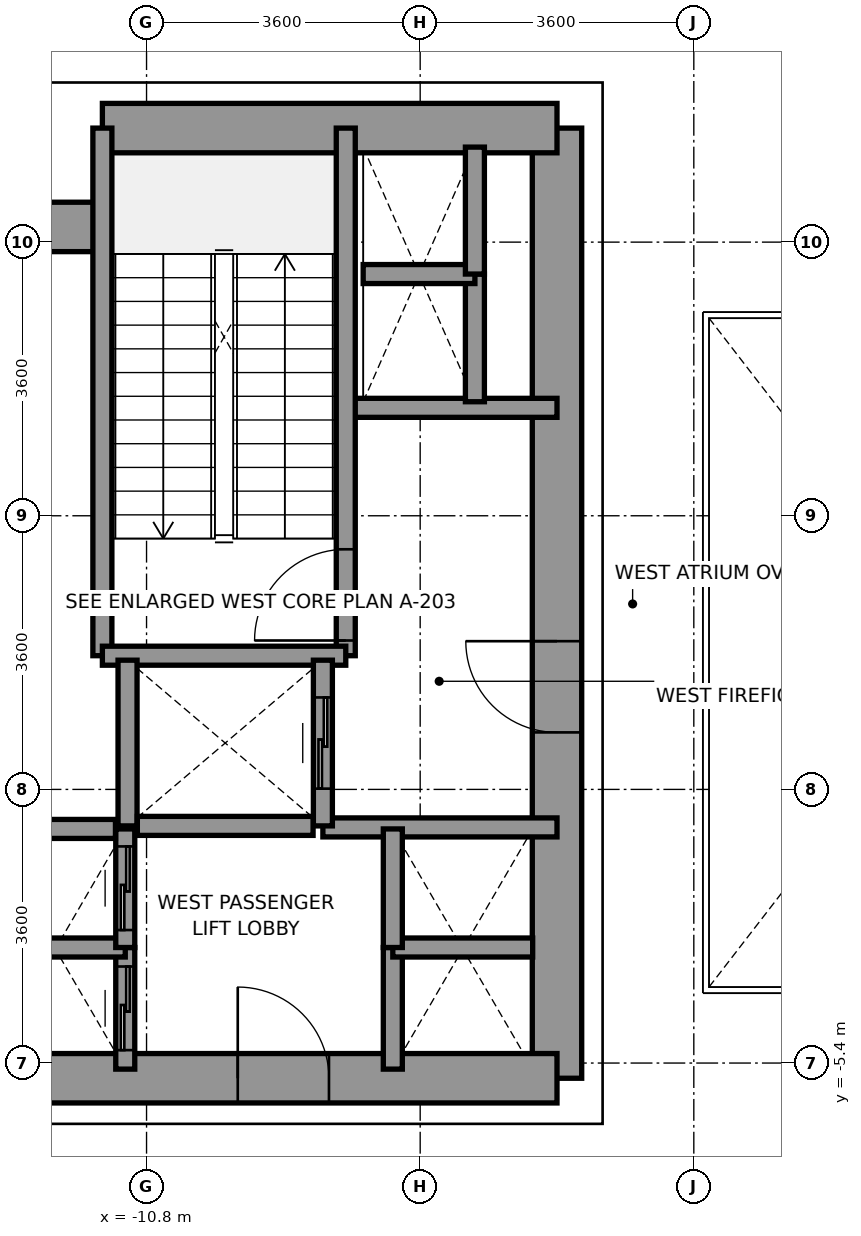
"""IFC4 building model, lengths in metres.
Left out: names, types, materials, properties, quantities, classifications, styles, units other than length and angle.
Written with IfcOpenShell. Run it as: python <this file> out.ifc"""

import sys

from ifc_helpers import new_model, si_unit, direction, frame, frame_2d, origin, place, context, subcontext, project, spatial, rectangle, extrude, source, transform, mapped, element, fill, save


model = new_model("IFC4")
c1 = context("Model", 3, precision=1e-05, world=origin(), true_north=direction((0.0, 1.0)))
c2 = subcontext(c1, "Body", "Model", "MODEL_VIEW")
j1 = project(units=[si_unit("LENGTHUNIT", "METRE"), si_unit("PLANEANGLEUNIT", "RADIAN")], contexts=[c1])
p1 = place(None, origin())
s1 = spatial("IfcSite", under=j1, at=p1, CompositionType="ELEMENT")
p2 = place(p1, origin())
s2 = spatial("IfcBuilding", under=s1, at=p2, CompositionType="ELEMENT")
p3 = place(p2, frame((0.0, 0.0, 5.4)))
s3 = spatial("IfcBuildingStorey", under=s2, at=p3, CompositionType="ELEMENT", Elevation=5.4)
p4 = place(p3, frame((-5.4, -5.6, 0.0), z_axis=(0.0, 0.0, 1.0), x_axis=(0.0, 1.0, 0.0)))
e1 = element("IfcWall", 1, at=p4, inside=s3, PredefinedType="SHEAR", context=c2, shape_type="SweptSolid", body=[
    extrude(rectangle(XDim=12.5, YDim=0.65, at=frame_2d((6.25, 0.0))), origin(), (0.0, 0.0, 1.0), 4.52),
])
p5 = place(p4, frame((4.55, 0.0, 0.0)))
e2 = element("IfcOpeningElement", 2, at=p5, cuts=e1, PredefinedType="OPENING", context=c2, shape_type="SweptSolid", body=[
    extrude(rectangle(XDim=1.2, YDim=2.2, at=frame_2d((0.6, 1.1))), frame((0.0, 0.335, 0.0), z_axis=(0.0, -1.0, 0.0), x_axis=(1.0, 0.0, 0.0)), (0.0, 0.0, 1.0), 0.67),
])
p6 = place(p3, frame((-11.381, 6.9, 0.0), z_axis=(0.0, 0.0, 1.0), x_axis=(1.0, 0.0, 0.0)))
e3 = element("IfcWall", 3, at=p6, inside=s3, PredefinedType="SHEAR", context=c2, shape_type="SweptSolid", body=[
    extrude(rectangle(XDim=5.981, YDim=0.65, at=frame_2d((2.991, 0.0))), origin(), (0.0, 0.0, 1.0), 4.52),
])
p7 = place(p3, frame((-13.2, 5.6, 0.0), z_axis=(0.0, 0.0, 1.0), x_axis=(1.0, 0.0, 0.0)))
e4 = element("IfcWall", 4, at=p7, inside=s3, PredefinedType="SHEAR", context=c2, shape_type="SweptSolid", body=[
    extrude(rectangle(XDim=1.819, YDim=0.65, at=frame_2d((0.909, 0.0))), origin(), (0.0, 0.0, 1.0), 4.52),
])
p8 = place(p3, frame((-13.2, -5.6, 0.0), z_axis=(0.0, 0.0, 1.0), x_axis=(1.0, 0.0, 0.0)))
e5 = element("IfcWall", 5, at=p8, inside=s3, PredefinedType="SHEAR", context=c2, shape_type="SweptSolid", body=[
    extrude(rectangle(XDim=7.8, YDim=0.65, at=frame_2d((3.9, 0.0))), origin(), (0.0, 0.0, 1.0), 4.52),
])
p9 = place(p8, frame((3.6, 0.0, 0.0)))
e6 = element("IfcOpeningElement", 6, at=p9, cuts=e5, PredefinedType="OPENING", context=c2, shape_type="SweptSolid", body=[
    extrude(rectangle(XDim=1.2, YDim=2.2, at=frame_2d((0.6, 1.1))), frame((0.0, 0.335, 0.0), z_axis=(0.0, -1.0, 0.0), x_axis=(1.0, 0.0, 0.0)), (0.0, 0.0, 1.0), 0.67),
])
p10 = place(p3, frame((-8.18, 3.22, 0.0), z_axis=(0.0, 0.0, 1.0), x_axis=(1.0, 0.0, 0.0)))
e7 = element("IfcWall", 7, at=p10, inside=s3, PredefinedType="SOLIDWALL", context=c2, shape_type="SweptSolid", body=[
    extrude(rectangle(XDim=2.78, YDim=0.25, at=frame_2d((1.39, 0.0))), origin(), (0.0, 0.0, 1.0), 4.52),
])
p11 = place(p3, frame((-8.48, -2.3, 0.0), z_axis=(0.0, 0.0, 1.0), x_axis=(1.0, 0.0, 0.0)))
e8 = element("IfcWall", 8, at=p11, inside=s3, PredefinedType="SOLIDWALL", context=c2, shape_type="SweptSolid", body=[
    extrude(rectangle(XDim=3.08, YDim=0.25, at=frame_2d((1.54, 0.0))), origin(), (0.0, 0.0, 1.0), 4.52),
])
p12 = place(p3, frame((-8.179, -0.041, 0.0), z_axis=(0.0, 0.0, 1.0), x_axis=(0.0, 1.0, 0.0)))
e9 = element("IfcWall", 9, at=p12, inside=s3, PredefinedType="SOLIDWALL", context=c2, shape_type="SweptSolid", body=[
    extrude(rectangle(XDim=6.941, YDim=0.25, at=frame_2d((3.47, 0.0))), origin(), (0.0, 0.0, 1.0), 4.52),
])
p13 = place(p12, frame((0.2, 0.0, 0.0)))
e10 = element("IfcOpeningElement", 10, at=p13, cuts=e9, PredefinedType="OPENING", context=c2, shape_type="SweptSolid", body=[
    extrude(rectangle(XDim=1.2, YDim=2.2, at=frame_2d((0.6, 1.1))), frame((0.0, 0.135, 0.0), z_axis=(0.0, -1.0, 0.0), x_axis=(1.0, 0.0, 0.0)), (0.0, 0.0, 1.0), 0.27),
])
p14 = place(p3, frame((-11.381, -0.041, 0.0), z_axis=(0.0, 0.0, 1.0), x_axis=(0.0, 1.0, 0.0)))
e11 = element("IfcWall", 11, at=p14, inside=s3, PredefinedType="SOLIDWALL", context=c2, shape_type="SweptSolid", body=[
    extrude(rectangle(XDim=6.941, YDim=0.25, at=frame_2d((3.47, 0.0))), origin(), (0.0, 0.0, 1.0), 4.52),
])
p15 = place(p3, frame((-11.381, -0.041, 0.0), z_axis=(0.0, 0.0, 1.0), x_axis=(1.0, 0.0, 0.0)))
e12 = element("IfcWall", 12, at=p15, inside=s3, PredefinedType="SOLIDWALL", context=c2, shape_type="SweptSolid", body=[
    extrude(rectangle(XDim=3.202, YDim=0.25, at=frame_2d((1.601, 0.0))), origin(), (0.0, 0.0, 1.0), 4.52),
])
p16 = place(p3, frame((-11.05, -2.28, 0.0), z_axis=(0.0, 0.0, 1.0), x_axis=(0.0, 1.0, 0.0)))
e13 = element("IfcWall", 13, at=p16, inside=s3, PredefinedType="SOLIDWALL", context=c2, shape_type="SweptSolid", body=[
    extrude(rectangle(XDim=2.18, YDim=0.25, at=frame_2d((1.09, 0.0))), origin(), (0.0, 0.0, 1.0), 4.52),
])
p17 = place(p3, frame((-8.48, -2.28, 0.0), z_axis=(0.0, 0.0, 1.0), x_axis=(0.0, 1.0, 0.0)))
e14 = element("IfcWall", 14, at=p17, inside=s3, PredefinedType="SOLIDWALL", context=c2, shape_type="SweptSolid", body=[
    extrude(rectangle(XDim=2.18, YDim=0.25, at=frame_2d((1.09, 0.0))), origin(), (0.0, 0.0, 1.0), 4.52),
])
p18 = place(p17, frame((0.49, 0.0, 0.0)))
e15 = element("IfcOpeningElement", 15, at=p18, cuts=e14, PredefinedType="OPENING", context=c2, shape_type="SweptSolid", body=[
    extrude(rectangle(XDim=1.2, YDim=2.2, at=frame_2d((0.6, 1.1))), frame((0.0, 0.135, 0.0), z_axis=(0.0, -1.0, 0.0), x_axis=(1.0, 0.0, 0.0)), (0.0, 0.0, 1.0), 0.27),
])
p19 = place(p3, frame((-10.921, -2.28, 0.0), z_axis=(0.0, 0.0, 1.0), x_axis=(1.0, 0.0, 0.0)))
e16 = element("IfcWall", 16, at=p19, inside=s3, PredefinedType="SOLIDWALL", context=c2, shape_type="SweptSolid", body=[
    extrude(rectangle(XDim=2.312, YDim=0.25, at=frame_2d((1.156, 0.0))), origin(), (0.0, 0.0, 1.0), 4.52),
])
p20 = place(p3, frame((-11.08, -5.48, 0.0), z_axis=(0.0, 0.0, 1.0), x_axis=(0.0, 1.0, 0.0)))
e17 = element("IfcWall", 17, at=p20, inside=s3, PredefinedType="SOLIDWALL", context=c2, shape_type="SweptSolid", body=[
    extrude(rectangle(XDim=1.6, YDim=0.25, at=frame_2d((0.8, 0.0))), origin(), (0.0, 0.0, 1.0), 4.52),
])
p21 = place(p20, frame((0.25, 0.0, 0.0)))
e18 = element("IfcOpeningElement", 18, at=p21, cuts=e17, PredefinedType="OPENING", context=c2, shape_type="SweptSolid", body=[
    extrude(rectangle(XDim=1.1, YDim=2.2, at=frame_2d((0.55, 1.1))), frame((0.0, 0.135, 0.0), z_axis=(0.0, -1.0, 0.0), x_axis=(1.0, 0.0, 0.0)), (0.0, 0.0, 1.0), 0.27),
])
p22 = place(p3, frame((-12.92, -3.88, 0.0), z_axis=(0.0, 0.0, 1.0), x_axis=(1.0, 0.0, 0.0)))
e19 = element("IfcWall", 19, at=p22, inside=s3, PredefinedType="SOLIDWALL", context=c2, shape_type="SweptSolid", body=[
    extrude(rectangle(XDim=1.84, YDim=0.25, at=frame_2d((0.92, 0.0))), origin(), (0.0, 0.0, 1.0), 4.52),
])
p23 = place(p3, frame((-11.08, -3.88, 0.0), z_axis=(0.0, 0.0, 1.0), x_axis=(0.0, 1.0, 0.0)))
e20 = element("IfcWall", 20, at=p23, inside=s3, PredefinedType="SOLIDWALL", context=c2, shape_type="SweptSolid", body=[
    extrude(rectangle(XDim=1.56, YDim=0.25, at=frame_2d((0.78, 0.0))), origin(), (0.0, 0.0, 1.0), 4.52),
])
p24 = place(p23, frame((0.23, 0.0, 0.0)))
e21 = element("IfcOpeningElement", 21, at=p24, cuts=e20, PredefinedType="OPENING", context=c2, shape_type="SweptSolid", body=[
    extrude(rectangle(XDim=1.1, YDim=2.2, at=frame_2d((0.55, 1.1))), frame((0.0, 0.135, 0.0), z_axis=(0.0, -1.0, 0.0), x_axis=(1.0, 0.0, 0.0)), (0.0, 0.0, 1.0), 0.27),
])
p25 = place(p3, frame((-12.791, -2.32, 0.0), z_axis=(0.0, 0.0, 1.0), x_axis=(1.0, 0.0, 0.0)))
e22 = element("IfcWall", 22, at=p25, inside=s3, PredefinedType="SOLIDWALL", context=c2, shape_type="SweptSolid", body=[
    extrude(rectangle(XDim=1.582, YDim=0.25, at=frame_2d((0.791, 0.0))), origin(), (0.0, 0.0, 1.0), 4.52),
])
p26 = place(p3, frame((-7.56, -5.48, 0.0), z_axis=(0.0, 0.0, 1.0), x_axis=(0.0, 1.0, 0.0)))
e23 = element("IfcWall", 23, at=p26, inside=s3, PredefinedType="SOLIDWALL", context=c2, shape_type="SweptSolid", body=[
    extrude(rectangle(XDim=1.6, YDim=0.25, at=frame_2d((0.8, 0.0))), origin(), (0.0, 0.0, 1.0), 4.52),
])
p27 = place(p3, frame((-7.56, -3.88, 0.0), z_axis=(0.0, 0.0, 1.0), x_axis=(1.0, 0.0, 0.0)))
e24 = element("IfcWall", 24, at=p27, inside=s3, PredefinedType="SOLIDWALL", context=c2, shape_type="SweptSolid", body=[
    extrude(rectangle(XDim=1.84, YDim=0.25, at=frame_2d((0.92, 0.0))), origin(), (0.0, 0.0, 1.0), 4.52),
])
p28 = place(p3, frame((-7.56, -3.88, 0.0), z_axis=(0.0, 0.0, 1.0), x_axis=(0.0, 1.0, 0.0)))
e25 = element("IfcWall", 25, at=p28, inside=s3, PredefinedType="SOLIDWALL", context=c2, shape_type="SweptSolid", body=[
    extrude(rectangle(XDim=1.56, YDim=0.25, at=frame_2d((0.78, 0.0))), origin(), (0.0, 0.0, 1.0), 4.52),
])
p29 = place(p3, frame((-6.48, 3.3, 0.0), z_axis=(0.0, 0.0, 1.0), x_axis=(0.0, 1.0, 0.0)))
e26 = element("IfcWall", 26, at=p29, inside=s3, PredefinedType="SOLIDWALL", context=c2, shape_type="SweptSolid", body=[
    extrude(rectangle(XDim=1.68, YDim=0.25, at=frame_2d((0.84, 0.0))), origin(), (0.0, 0.0, 1.0), 4.52),
])
p30 = place(p3, frame((-7.95, 4.98, 0.0), z_axis=(0.0, 0.0, 1.0), x_axis=(1.0, 0.0, 0.0)))
e27 = element("IfcWall", 27, at=p30, inside=s3, PredefinedType="SOLIDWALL", context=c2, shape_type="SweptSolid", body=[
    extrude(rectangle(XDim=1.47, YDim=0.25, at=frame_2d((0.735, 0.0))), origin(), (0.0, 0.0, 1.0), 4.52),
])
p31 = place(p3, frame((-6.48, 4.98, 0.0), z_axis=(0.0, 0.0, 1.0), x_axis=(0.0, 1.0, 0.0)))
e28 = element("IfcWall", 28, at=p31, inside=s3, PredefinedType="SOLIDWALL", context=c2, shape_type="SweptSolid", body=[
    extrude(rectangle(XDim=1.67, YDim=0.25, at=frame_2d((0.835, 0.0))), origin(), (0.0, 0.0, 1.0), 4.52),
])
m1 = source(origin(), c2, "Body", "SweptSolid", [
    extrude(rectangle(XDim=1.2, YDim=2.2, at=frame_2d((0.6, 1.1))), frame((0.0, 0.025, 0.0), z_axis=(0.0, -1.0, 0.0), x_axis=(1.0, 0.0, 0.0)), (0.0, 0.0, 1.0), 0.05),
])
p32 = place(p13, origin())
e29 = element("IfcDoor", 29, at=p32, inside=s3, OperationType="SINGLE_SWING_LEFT", PredefinedType="DOOR", context=c2, shape_type="MappedRepresentation", body=[
    mapped(m1, transform((0.0, 0.0, 0.0), x_axis=(1.0, 0.0, 0.0), y_axis=(0.0, 1.0, 0.0), z_axis=(0.0, 0.0, 1.0), scale=1.0)),
])
fill(e10, e29)
p33 = place(p5, origin())
e30 = element("IfcDoor", 30, at=p33, inside=s3, OperationType="SINGLE_SWING_RIGHT", PredefinedType="DOOR", context=c2, shape_type="MappedRepresentation", body=[
    mapped(m1, transform((0.0, 0.0, 0.0), x_axis=(1.0, 0.0, 0.0), y_axis=(0.0, 1.0, 0.0), z_axis=(0.0, 0.0, 1.0), scale=1.0)),
])
fill(e2, e30)
p34 = place(p9, origin())
e31 = element("IfcDoor", 31, at=p34, inside=s3, OperationType="SINGLE_SWING_LEFT", PredefinedType="DOOR", context=c2, shape_type="MappedRepresentation", body=[
    mapped(m1, transform((0.0, 0.0, 0.0), x_axis=(1.0, 0.0, 0.0), y_axis=(0.0, 1.0, 0.0), z_axis=(0.0, 0.0, 1.0), scale=1.0)),
])
fill(e6, e31)
p35 = place(p18, origin())
e32 = element("IfcDoor", 32, at=p35, inside=s3, OperationType="SLIDING_TO_RIGHT", PredefinedType="DOOR", context=c2, shape_type="MappedRepresentation", body=[
    mapped(m1, transform((0.0, 0.0, 0.0), x_axis=(1.0, 0.0, 0.0), y_axis=(0.0, 1.0, 0.0), z_axis=(0.0, 0.0, 1.0), scale=1.0)),
])
fill(e15, e32)
m2 = source(origin(), c2, "Body", "SweptSolid", [
    extrude(rectangle(XDim=1.1, YDim=2.2, at=frame_2d((0.55, 1.1))), frame((0.0, 0.025, 0.0), z_axis=(0.0, -1.0, 0.0), x_axis=(1.0, 0.0, 0.0)), (0.0, 0.0, 1.0), 0.05),
])
p36 = place(p21, origin())
e33 = element("IfcDoor", 33, at=p36, inside=s3, OperationType="SLIDING_TO_LEFT", PredefinedType="DOOR", context=c2, shape_type="MappedRepresentation", body=[
    mapped(m2, transform((0.0, 0.0, 0.0), x_axis=(1.0, 0.0, 0.0), y_axis=(0.0, 1.0, 0.0), z_axis=(0.0, 0.0, 1.0), scale=1.0)),
])
fill(e18, e33)
p37 = place(p24, origin())
e34 = element("IfcDoor", 34, at=p37, inside=s3, OperationType="SLIDING_TO_LEFT", PredefinedType="DOOR", context=c2, shape_type="MappedRepresentation", body=[
    mapped(m2, transform((0.0, 0.0, 0.0), x_axis=(1.0, 0.0, 0.0), y_axis=(0.0, 1.0, 0.0), z_axis=(0.0, 0.0, 1.0), scale=1.0)),
])
fill(e21, e34)
save(model, sys.argv[1])
